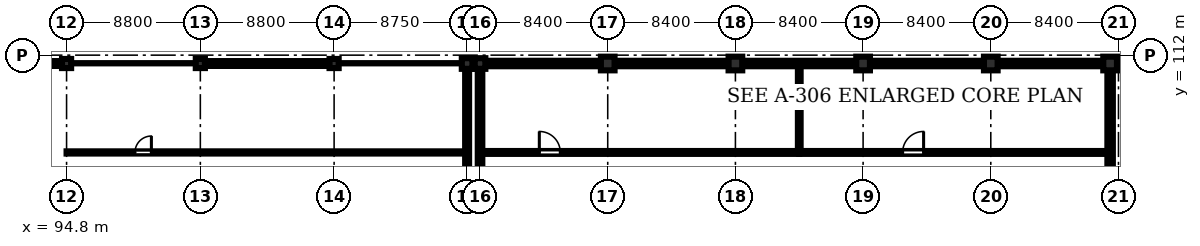
"""IFC4 building model, lengths in metres.
Left out: names, types, materials, properties, quantities, classifications, styles, units other than length and angle.
Written with IfcOpenShell. Run it as: python <this file> out.ifc"""

import sys

from ifc_helpers import new_model, si_unit, direction, frame, frame_2d, origin, origin_2d, place, context, subcontext, project, spatial, rectangle, extrude, element, fill, save


model = new_model("IFC4")
c1 = context("Model", 3, precision=1e-05, world=origin(), true_north=direction((0.0, 1.0)))
c2 = subcontext(c1, "Body", "Model", "MODEL_VIEW")
j1 = project(units=[si_unit("LENGTHUNIT", "METRE"), si_unit("PLANEANGLEUNIT", "RADIAN")], contexts=[c1])
p1 = place(None, origin())
s1 = spatial("IfcSite", under=j1, at=p1, CompositionType="ELEMENT")
p2 = place(p1, origin())
s2 = spatial("IfcBuilding", under=s1, at=p2, CompositionType="ELEMENT")
p3 = place(p2, frame((0.0, 0.0, 14.7)))
s3 = spatial("IfcBuildingStorey", under=s2, at=p3, CompositionType="ELEMENT", Elevation=14.7)
for number, where, z_axis, x_axis in (
    (1, (94.8, 111.45, 0.0), (0.0, 0.0, 1.0), (1.0, 0.0, 0.0)),
    (2, (103.6, 111.45, 0.0), (0.0, 0.0, 1.0), (1.0, 0.0, 0.0)),
    (3, (112.4, 111.45, 0.0), (0.0, 0.0, 1.0), (1.0, 0.0, 0.0)),
):
    element("IfcColumn", number, at=place(p3, frame(where, z_axis=z_axis, x_axis=x_axis)), inside=s3, PredefinedType="COLUMN", context=c2, shape_type="SweptSolid", body=[
        extrude(rectangle(XDim=0.6, YDim=0.6, at=origin_2d()), origin(), (0.0, 0.0, 1.0), 4.5),
    ])
p4 = place(p3, frame((121.15, 111.45, 0.0), z_axis=(0.0, 0.0, 1.0), x_axis=(1.0, 0.0, 0.0)))
e4 = element("IfcColumn", 4, at=p4, inside=s3, PredefinedType="COLUMN", context=c2, shape_type="SweptSolid", body=[
    extrude(rectangle(XDim=0.7, YDim=0.7, at=origin_2d()), origin(), (0.0, 0.0, 1.0), 4.5),
])
p5 = place(p3, frame((122.0, 111.45, 0.0), z_axis=(0.0, 0.0, 1.0), x_axis=(1.0, 0.0, 0.0)))
e5 = element("IfcColumn", 5, at=p5, inside=s3, PredefinedType="COLUMN", context=c2, shape_type="SweptSolid", body=[
    extrude(rectangle(XDim=0.7, YDim=0.7, at=origin_2d()), origin(), (0.0, 0.0, 1.0), 4.26),
])
for number, where, z_axis, x_axis in (
    (6, (130.4, 111.45, 0.0), (0.0, 0.0, 1.0), (1.0, 0.0, 0.0)),
    (7, (138.8, 111.45, 0.0), (0.0, 0.0, 1.0), (1.0, 0.0, 0.0)),
    (8, (147.2, 111.45, 0.0), (0.0, 0.0, 1.0), (1.0, 0.0, 0.0)),
    (9, (155.6, 111.45, 0.0), (0.0, 0.0, 1.0), (1.0, 0.0, 0.0)),
    (10, (163.45, 111.45, 0.0), (0.0, 0.0, 1.0), (1.0, 0.0, 0.0)),
):
    element("IfcColumn", number, at=place(p3, frame(where, z_axis=z_axis, x_axis=x_axis)), inside=s3, PredefinedType="COLUMN", context=c2, shape_type="SweptSolid", body=[
        extrude(rectangle(XDim=0.9, YDim=0.9, at=origin_2d()), origin(), (0.0, 0.0, 1.0), 4.26),
    ])
p6 = place(p3, frame((86.3, 111.45, 0.0), z_axis=(0.0, 0.0, 1.0), x_axis=(1.0, 0.0, 0.0)))
e11 = element("IfcWall", 11, at=p6, inside=s3, PredefinedType="STANDARD", context=c2, shape_type="SweptSolid", body=[
    extrude(rectangle(XDim=8.2, YDim=0.32, at=frame_2d((4.1, 0.0))), origin(), (0.0, 0.0, 1.0), 4.3),
])
p7 = place(p6, frame((1.1, 0.0, 0.9)))
e12 = element("IfcOpeningElement", 12, at=p7, cuts=e11, PredefinedType="OPENING", context=c2, shape_type="SweptSolid", body=[
    extrude(rectangle(XDim=2.7, YDim=2.2, at=frame_2d((1.35, 1.1))), frame((0.0, 0.17, 0.0), z_axis=(0.0, -1.0, 0.0), x_axis=(1.0, 0.0, 0.0)), (0.0, 0.0, 1.0), 0.34),
])
p8 = place(p6, frame((4.7, 0.0, 0.9)))
e13 = element("IfcOpeningElement", 13, at=p8, cuts=e11, PredefinedType="OPENING", context=c2, shape_type="SweptSolid", body=[
    extrude(rectangle(XDim=2.7, YDim=2.2, at=frame_2d((1.35, 1.1))), frame((0.0, 0.17, 0.0), z_axis=(0.0, -1.0, 0.0), x_axis=(1.0, 0.0, 0.0)), (0.0, 0.0, 1.0), 0.34),
])
p9 = place(p3, frame((103.9, 111.45, 0.0), z_axis=(0.0, 0.0, 1.0), x_axis=(1.0, 0.0, 0.0)))
e14 = element("IfcWall", 14, at=p9, inside=s3, PredefinedType="STANDARD", context=c2, shape_type="SweptSolid", body=[
    extrude(rectangle(XDim=8.2, YDim=0.32, at=frame_2d((4.1, 0.0))), origin(), (0.0, 0.0, 1.0), 4.3),
])
p10 = place(p9, frame((1.1, 0.0, 0.9)))
e15 = element("IfcOpeningElement", 15, at=p10, cuts=e14, PredefinedType="OPENING", context=c2, shape_type="SweptSolid", body=[
    extrude(rectangle(XDim=2.7, YDim=2.2, at=frame_2d((1.35, 1.1))), frame((0.0, 0.17, 0.0), z_axis=(0.0, -1.0, 0.0), x_axis=(1.0, 0.0, 0.0)), (0.0, 0.0, 1.0), 0.34),
])
p11 = place(p9, frame((4.7, 0.0, 0.9)))
e16 = element("IfcOpeningElement", 16, at=p11, cuts=e14, PredefinedType="OPENING", context=c2, shape_type="SweptSolid", body=[
    extrude(rectangle(XDim=2.7, YDim=2.2, at=frame_2d((1.35, 1.1))), frame((0.0, 0.17, 0.0), z_axis=(0.0, -1.0, 0.0), x_axis=(1.0, 0.0, 0.0)), (0.0, 0.0, 1.0), 0.34),
])
p12 = place(p3, frame((121.15, 111.1, 0.0), z_axis=(0.0, 0.0, 1.0), x_axis=(0.0, -1.0, 0.0)))
e17 = element("IfcWall", 17, at=p12, inside=s3, PredefinedType="STANDARD", context=c2, shape_type="SweptSolid", body=[
    extrude(rectangle(XDim=7.15, YDim=0.26, at=frame_2d((3.575, 0.0))), origin(), (0.0, 0.0, 1.0), 4.3),
])
p13 = place(p3, frame((122.35, 111.45, 0.0), z_axis=(0.0, 0.0, 1.0), x_axis=(1.0, 0.0, 0.0)))
e18 = element("IfcWall", 18, at=p13, inside=s3, PredefinedType="STANDARD", context=c2, shape_type="SweptSolid", body=[
    extrude(rectangle(XDim=7.6, YDim=0.36, at=frame_2d((3.8, 0.0))), origin(), (0.0, 0.0, 1.0), 3.56),
])
p14 = place(p13, frame((1.3, 0.0, 1.1)))
e19 = element("IfcOpeningElement", 19, at=p14, cuts=e18, PredefinedType="OPENING", context=c2, shape_type="SweptSolid", body=[
    extrude(rectangle(XDim=1.2, YDim=1.8, at=frame_2d((0.6, 0.9))), frame((0.0, 0.19, 0.0), z_axis=(0.0, -1.0, 0.0), x_axis=(1.0, 0.0, 0.0)), (0.0, 0.0, 1.0), 0.38),
])
p15 = place(p13, frame((5.1, 0.0, 1.1)))
e20 = element("IfcOpeningElement", 20, at=p15, cuts=e18, PredefinedType="OPENING", context=c2, shape_type="SweptSolid", body=[
    extrude(rectangle(XDim=1.2, YDim=1.8, at=frame_2d((0.6, 0.9))), frame((0.0, 0.19, 0.0), z_axis=(0.0, -1.0, 0.0), x_axis=(1.0, 0.0, 0.0)), (0.0, 0.0, 1.0), 0.38),
])
p16 = place(p3, frame((130.85, 111.45, 0.0), z_axis=(0.0, 0.0, 1.0), x_axis=(1.0, 0.0, 0.0)))
e21 = element("IfcWall", 21, at=p16, inside=s3, PredefinedType="STANDARD", context=c2, shape_type="SweptSolid", body=[
    extrude(rectangle(XDim=7.5, YDim=0.36, at=frame_2d((3.75, 0.0))), origin(), (0.0, 0.0, 1.0), 3.56),
])
p17 = place(p16, frame((1.3, 0.0, 1.1)))
e22 = element("IfcOpeningElement", 22, at=p17, cuts=e21, PredefinedType="OPENING", context=c2, shape_type="SweptSolid", body=[
    extrude(rectangle(XDim=1.2, YDim=1.8, at=frame_2d((0.6, 0.9))), frame((0.0, 0.19, 0.0), z_axis=(0.0, -1.0, 0.0), x_axis=(1.0, 0.0, 0.0)), (0.0, 0.0, 1.0), 0.38),
])
p18 = place(p16, frame((5.1, 0.0, 1.1)))
e23 = element("IfcOpeningElement", 23, at=p18, cuts=e21, PredefinedType="OPENING", context=c2, shape_type="SweptSolid", body=[
    extrude(rectangle(XDim=1.2, YDim=1.8, at=frame_2d((0.6, 0.9))), frame((0.0, 0.19, 0.0), z_axis=(0.0, -1.0, 0.0), x_axis=(1.0, 0.0, 0.0)), (0.0, 0.0, 1.0), 0.38),
])
p19 = place(p3, frame((139.25, 111.45, 0.0), z_axis=(0.0, 0.0, 1.0), x_axis=(1.0, 0.0, 0.0)))
e24 = element("IfcWall", 24, at=p19, inside=s3, PredefinedType="STANDARD", context=c2, shape_type="SweptSolid", body=[
    extrude(rectangle(XDim=7.5, YDim=0.36, at=frame_2d((3.75, 0.0))), origin(), (0.0, 0.0, 1.0), 3.56),
])
p20 = place(p19, frame((1.3, 0.0, 1.1)))
e25 = element("IfcOpeningElement", 25, at=p20, cuts=e24, PredefinedType="OPENING", context=c2, shape_type="SweptSolid", body=[
    extrude(rectangle(XDim=1.2, YDim=1.8, at=frame_2d((0.6, 0.9))), frame((0.0, 0.19, 0.0), z_axis=(0.0, -1.0, 0.0), x_axis=(1.0, 0.0, 0.0)), (0.0, 0.0, 1.0), 0.38),
])
p21 = place(p19, frame((5.1, 0.0, 1.1)))
e26 = element("IfcOpeningElement", 26, at=p21, cuts=e24, PredefinedType="OPENING", context=c2, shape_type="SweptSolid", body=[
    extrude(rectangle(XDim=1.2, YDim=1.8, at=frame_2d((0.6, 0.9))), frame((0.0, 0.19, 0.0), z_axis=(0.0, -1.0, 0.0), x_axis=(1.0, 0.0, 0.0)), (0.0, 0.0, 1.0), 0.38),
])
p22 = place(p3, frame((147.65, 111.45, 0.0), z_axis=(0.0, 0.0, 1.0), x_axis=(1.0, 0.0, 0.0)))
e27 = element("IfcWall", 27, at=p22, inside=s3, PredefinedType="STANDARD", context=c2, shape_type="SweptSolid", body=[
    extrude(rectangle(XDim=7.5, YDim=0.36, at=frame_2d((3.75, 0.0))), origin(), (0.0, 0.0, 1.0), 3.56),
])
p23 = place(p22, frame((1.3, 0.0, 1.1)))
e28 = element("IfcOpeningElement", 28, at=p23, cuts=e27, PredefinedType="OPENING", context=c2, shape_type="SweptSolid", body=[
    extrude(rectangle(XDim=1.2, YDim=1.8, at=frame_2d((0.6, 0.9))), frame((0.0, 0.19, 0.0), z_axis=(0.0, -1.0, 0.0), x_axis=(1.0, 0.0, 0.0)), (0.0, 0.0, 1.0), 0.38),
])
p24 = place(p22, frame((5.1, 0.0, 1.1)))
e29 = element("IfcOpeningElement", 29, at=p24, cuts=e27, PredefinedType="OPENING", context=c2, shape_type="SweptSolid", body=[
    extrude(rectangle(XDim=1.2, YDim=1.8, at=frame_2d((0.6, 0.9))), frame((0.0, 0.19, 0.0), z_axis=(0.0, -1.0, 0.0), x_axis=(1.0, 0.0, 0.0)), (0.0, 0.0, 1.0), 0.38),
])
p25 = place(p3, frame((156.05, 111.45, 0.0), z_axis=(0.0, 0.0, 1.0), x_axis=(1.0, 0.0, 0.0)))
e30 = element("IfcWall", 30, at=p25, inside=s3, PredefinedType="STANDARD", context=c2, shape_type="SweptSolid", body=[
    extrude(rectangle(XDim=6.95, YDim=0.36, at=frame_2d((3.475, 0.0))), origin(), (0.0, 0.0, 1.0), 3.56),
])
p26 = place(p25, frame((1.3, 0.0, 1.1)))
e31 = element("IfcOpeningElement", 31, at=p26, cuts=e30, PredefinedType="OPENING", context=c2, shape_type="SweptSolid", body=[
    extrude(rectangle(XDim=1.2, YDim=1.8, at=frame_2d((0.6, 0.9))), frame((0.0, 0.19, 0.0), z_axis=(0.0, -1.0, 0.0), x_axis=(1.0, 0.0, 0.0)), (0.0, 0.0, 1.0), 0.38),
])
p27 = place(p25, frame((5.1, 0.0, 1.1)))
e32 = element("IfcOpeningElement", 32, at=p27, cuts=e30, PredefinedType="OPENING", context=c2, shape_type="SweptSolid", body=[
    extrude(rectangle(XDim=1.2, YDim=1.8, at=frame_2d((0.6, 0.9))), frame((0.0, 0.19, 0.0), z_axis=(0.0, -1.0, 0.0), x_axis=(1.0, 0.0, 0.0)), (0.0, 0.0, 1.0), 0.38),
])
p28 = place(p3, frame((163.45, 111.0, 0.0), z_axis=(0.0, 0.0, 1.0), x_axis=(0.0, -1.0, 0.0)))
e33 = element("IfcWall", 33, at=p28, inside=s3, PredefinedType="STANDARD", context=c2, shape_type="SweptSolid", body=[
    extrude(rectangle(XDim=6.95, YDim=0.36, at=frame_2d((3.475, 0.0))), origin(), (0.0, 0.0, 1.0), 3.56),
])
p29 = place(p28, frame((1.15, 0.0, 1.1)))
e34 = element("IfcOpeningElement", 34, at=p29, cuts=e33, PredefinedType="OPENING", context=c2, shape_type="SweptSolid", body=[
    extrude(rectangle(XDim=1.8, YDim=1.8, at=frame_2d((0.9, 0.9))), frame((0.0, 0.19, 0.0), z_axis=(0.0, -1.0, 0.0), x_axis=(1.0, 0.0, 0.0)), (0.0, 0.0, 1.0), 0.38),
])
p30 = place(p3, frame((122.0, 103.95, 0.0), z_axis=(0.0, 0.0, 1.0), x_axis=(0.0, 1.0, 0.0)))
e35 = element("IfcWall", 35, at=p30, inside=s3, PredefinedType="STANDARD", context=c2, shape_type="SweptSolid", body=[
    extrude(rectangle(XDim=7.15, YDim=0.3, at=frame_2d((3.575, 0.0))), origin(), (0.0, 0.0, 1.0), 3.51),
])
p31 = place(p3, frame((94.8, 105.6, 0.0), z_axis=(0.0, 0.0, 1.0), x_axis=(1.0, 0.0, 0.0)))
e36 = element("IfcWall", 36, at=p31, inside=s3, PredefinedType="PARTITIONING", context=c2, shape_type="SweptSolid", body=[
    extrude(rectangle(XDim=26.22, YDim=0.145, at=frame_2d((13.11, 0.0))), origin(), (0.0, 0.0, 1.0), 4.25),
])
p32 = place(p31, frame((4.5, 0.0, 0.0)))
e37 = element("IfcOpeningElement", 37, at=p32, cuts=e36, PredefinedType="OPENING", context=c2, shape_type="SweptSolid", body=[
    extrude(rectangle(XDim=1.08, YDim=2.15, at=frame_2d((0.54, 1.075))), frame((0.0, 0.083, 0.0), z_axis=(0.0, -1.0, 0.0), x_axis=(1.0, 0.0, 0.0)), (0.0, 0.0, 1.0), 0.165),
])
p33 = place(p3, frame((122.15, 105.6, 0.0), z_axis=(0.0, 0.0, 1.0), x_axis=(1.0, 0.0, 0.0)))
e38 = element("IfcWall", 38, at=p33, inside=s3, PredefinedType="SOLIDWALL", context=c2, shape_type="SweptSolid", body=[
    extrude(rectangle(XDim=20.85, YDim=0.19, at=frame_2d((10.425, 0.0))), origin(), (0.0, 0.0, 1.0), 4.26),
])
p34 = place(p33, frame((3.75, 0.0, 0.0)))
e39 = element("IfcOpeningElement", 39, at=p34, cuts=e38, PredefinedType="OPENING", context=c2, shape_type="SweptSolid", body=[
    extrude(rectangle(XDim=1.38, YDim=2.22, at=frame_2d((0.69, 1.11))), frame((0.0, 0.105, 0.0), z_axis=(0.0, -1.0, 0.0), x_axis=(1.0, 0.0, 0.0)), (0.0, 0.0, 1.0), 0.21),
])
p35 = place(p3, frame((143.0, 105.6, 0.0), z_axis=(0.0, 0.0, 1.0), x_axis=(1.0, 0.0, 0.0)))
e40 = element("IfcWall", 40, at=p35, inside=s3, PredefinedType="SOLIDWALL", context=c2, shape_type="SweptSolid", body=[
    extrude(rectangle(XDim=20.35, YDim=0.19, at=frame_2d((10.175, 0.0))), origin(), (0.0, 0.0, 1.0), 4.26),
])
p36 = place(p35, frame((6.8, 0.0, 0.0)))
e41 = element("IfcOpeningElement", 41, at=p36, cuts=e40, PredefinedType="OPENING", context=c2, shape_type="SweptSolid", body=[
    extrude(rectangle(XDim=1.38, YDim=2.22, at=frame_2d((0.69, 1.11))), frame((0.0, 0.105, 0.0), z_axis=(0.0, -1.0, 0.0), x_axis=(1.0, 0.0, 0.0)), (0.0, 0.0, 1.0), 0.21),
])
p37 = place(p3, frame((143.0, 105.6, 0.0), z_axis=(0.0, 0.0, 1.0), x_axis=(0.0, 1.0, 0.0)))
e42 = element("IfcWall", 42, at=p37, inside=s3, PredefinedType="STANDARD", context=c2, shape_type="SweptSolid", body=[
    extrude(rectangle(XDim=5.75, YDim=0.18, at=frame_2d((2.875, 0.0))), origin(), (0.0, 0.0, 1.0), 3.76),
])
p38 = place(p10, origin())
e43 = element("IfcWindow", 43, at=p38, inside=s3, PartitioningType="TRIPLE_PANEL_VERTICAL", PredefinedType="WINDOW", context=c2, shape_type="SweptSolid", body=[
    extrude(rectangle(XDim=2.7, YDim=2.2, at=frame_2d((1.35, 1.1))), frame((0.0, 0.03, 0.0), z_axis=(0.0, -1.0, 0.0), x_axis=(1.0, 0.0, 0.0)), (0.0, 0.0, 1.0), 0.06),
])
fill(e15, e43)
p39 = place(p11, origin())
e44 = element("IfcWindow", 44, at=p39, inside=s3, PartitioningType="TRIPLE_PANEL_VERTICAL", PredefinedType="WINDOW", context=c2, shape_type="SweptSolid", body=[
    extrude(rectangle(XDim=2.7, YDim=2.2, at=frame_2d((1.35, 1.1))), frame((0.0, 0.03, 0.0), z_axis=(0.0, -1.0, 0.0), x_axis=(1.0, 0.0, 0.0)), (0.0, 0.0, 1.0), 0.06),
])
fill(e16, e44)
p40 = place(p14, origin())
e45 = element("IfcWindow", 45, at=p40, inside=s3, PartitioningType="SINGLE_PANEL", PredefinedType="WINDOW", context=c2, shape_type="SweptSolid", body=[
    extrude(rectangle(XDim=1.2, YDim=1.8, at=frame_2d((0.6, 0.9))), frame((0.0, 0.03, 0.0), z_axis=(0.0, -1.0, 0.0), x_axis=(1.0, 0.0, 0.0)), (0.0, 0.0, 1.0), 0.06),
])
fill(e19, e45)
p41 = place(p15, origin())
e46 = element("IfcWindow", 46, at=p41, inside=s3, PartitioningType="SINGLE_PANEL", PredefinedType="WINDOW", context=c2, shape_type="SweptSolid", body=[
    extrude(rectangle(XDim=1.2, YDim=1.8, at=frame_2d((0.6, 0.9))), frame((0.0, 0.03, 0.0), z_axis=(0.0, -1.0, 0.0), x_axis=(1.0, 0.0, 0.0)), (0.0, 0.0, 1.0), 0.06),
])
fill(e20, e46)
p42 = place(p17, origin())
e47 = element("IfcWindow", 47, at=p42, inside=s3, PartitioningType="SINGLE_PANEL", PredefinedType="WINDOW", context=c2, shape_type="SweptSolid", body=[
    extrude(rectangle(XDim=1.2, YDim=1.8, at=frame_2d((0.6, 0.9))), frame((0.0, 0.03, 0.0), z_axis=(0.0, -1.0, 0.0), x_axis=(1.0, 0.0, 0.0)), (0.0, 0.0, 1.0), 0.06),
])
fill(e22, e47)
p43 = place(p18, origin())
e48 = element("IfcWindow", 48, at=p43, inside=s3, PartitioningType="SINGLE_PANEL", PredefinedType="WINDOW", context=c2, shape_type="SweptSolid", body=[
    extrude(rectangle(XDim=1.2, YDim=1.8, at=frame_2d((0.6, 0.9))), frame((0.0, 0.03, 0.0), z_axis=(0.0, -1.0, 0.0), x_axis=(1.0, 0.0, 0.0)), (0.0, 0.0, 1.0), 0.06),
])
fill(e23, e48)
p44 = place(p20, origin())
e49 = element("IfcWindow", 49, at=p44, inside=s3, PartitioningType="SINGLE_PANEL", PredefinedType="WINDOW", context=c2, shape_type="SweptSolid", body=[
    extrude(rectangle(XDim=1.2, YDim=1.8, at=frame_2d((0.6, 0.9))), frame((0.0, 0.03, 0.0), z_axis=(0.0, -1.0, 0.0), x_axis=(1.0, 0.0, 0.0)), (0.0, 0.0, 1.0), 0.06),
])
fill(e25, e49)
p45 = place(p21, origin())
e50 = element("IfcWindow", 50, at=p45, inside=s3, PartitioningType="SINGLE_PANEL", PredefinedType="WINDOW", context=c2, shape_type="SweptSolid", body=[
    extrude(rectangle(XDim=1.2, YDim=1.8, at=frame_2d((0.6, 0.9))), frame((0.0, 0.03, 0.0), z_axis=(0.0, -1.0, 0.0), x_axis=(1.0, 0.0, 0.0)), (0.0, 0.0, 1.0), 0.06),
])
fill(e26, e50)
p46 = place(p23, origin())
e51 = element("IfcWindow", 51, at=p46, inside=s3, PartitioningType="SINGLE_PANEL", PredefinedType="WINDOW", context=c2, shape_type="SweptSolid", body=[
    extrude(rectangle(XDim=1.2, YDim=1.8, at=frame_2d((0.6, 0.9))), frame((0.0, 0.03, 0.0), z_axis=(0.0, -1.0, 0.0), x_axis=(1.0, 0.0, 0.0)), (0.0, 0.0, 1.0), 0.06),
])
fill(e28, e51)
p47 = place(p24, origin())
e52 = element("IfcWindow", 52, at=p47, inside=s3, PartitioningType="SINGLE_PANEL", PredefinedType="WINDOW", context=c2, shape_type="SweptSolid", body=[
    extrude(rectangle(XDim=1.2, YDim=1.8, at=frame_2d((0.6, 0.9))), frame((0.0, 0.03, 0.0), z_axis=(0.0, -1.0, 0.0), x_axis=(1.0, 0.0, 0.0)), (0.0, 0.0, 1.0), 0.06),
])
fill(e29, e52)
p48 = place(p26, origin())
e53 = element("IfcWindow", 53, at=p48, inside=s3, PartitioningType="SINGLE_PANEL", PredefinedType="WINDOW", context=c2, shape_type="SweptSolid", body=[
    extrude(rectangle(XDim=1.2, YDim=1.8, at=frame_2d((0.6, 0.9))), frame((0.0, 0.03, 0.0), z_axis=(0.0, -1.0, 0.0), x_axis=(1.0, 0.0, 0.0)), (0.0, 0.0, 1.0), 0.06),
])
fill(e31, e53)
p49 = place(p27, origin())
e54 = element("IfcWindow", 54, at=p49, inside=s3, PartitioningType="SINGLE_PANEL", PredefinedType="WINDOW", context=c2, shape_type="SweptSolid", body=[
    extrude(rectangle(XDim=1.2, YDim=1.8, at=frame_2d((0.6, 0.9))), frame((0.0, 0.03, 0.0), z_axis=(0.0, -1.0, 0.0), x_axis=(1.0, 0.0, 0.0)), (0.0, 0.0, 1.0), 0.06),
])
fill(e32, e54)
p50 = place(p29, origin())
e55 = element("IfcWindow", 55, at=p50, inside=s3, PartitioningType="DOUBLE_PANEL_VERTICAL", PredefinedType="WINDOW", context=c2, shape_type="SweptSolid", body=[
    extrude(rectangle(XDim=1.8, YDim=1.8, at=frame_2d((0.9, 0.9))), frame((0.0, 0.03, 0.0), z_axis=(0.0, -1.0, 0.0), x_axis=(1.0, 0.0, 0.0)), (0.0, 0.0, 1.0), 0.06),
])
fill(e34, e55)
p51 = place(p32, origin())
e56 = element("IfcDoor", 56, at=p51, inside=s3, OperationType="SINGLE_SWING_RIGHT", PredefinedType="DOOR", context=c2, shape_type="SweptSolid", body=[
    extrude(rectangle(XDim=1.08, YDim=2.15, at=frame_2d((0.54, 1.075))), frame((0.0, 0.025, 0.0), z_axis=(0.0, -1.0, 0.0), x_axis=(1.0, 0.0, 0.0)), (0.0, 0.0, 1.0), 0.05),
])
fill(e37, e56)
p52 = place(p34, origin())
e57 = element("IfcDoor", 57, at=p52, inside=s3, OperationType="SINGLE_SWING_LEFT", PredefinedType="DOOR", context=c2, shape_type="SweptSolid", body=[
    extrude(rectangle(XDim=1.38, YDim=2.22, at=frame_2d((0.69, 1.11))), frame((0.0, 0.025, 0.0), z_axis=(0.0, -1.0, 0.0), x_axis=(1.0, 0.0, 0.0)), (0.0, 0.0, 1.0), 0.05),
])
fill(e39, e57)
p53 = place(p36, origin())
e58 = element("IfcDoor", 58, at=p53, inside=s3, OperationType="SINGLE_SWING_RIGHT", PredefinedType="DOOR", context=c2, shape_type="SweptSolid", body=[
    extrude(rectangle(XDim=1.38, YDim=2.22, at=frame_2d((0.69, 1.11))), frame((0.0, 0.025, 0.0), z_axis=(0.0, -1.0, 0.0), x_axis=(1.0, 0.0, 0.0)), (0.0, 0.0, 1.0), 0.05),
])
fill(e41, e58)
save(model, sys.argv[1])
